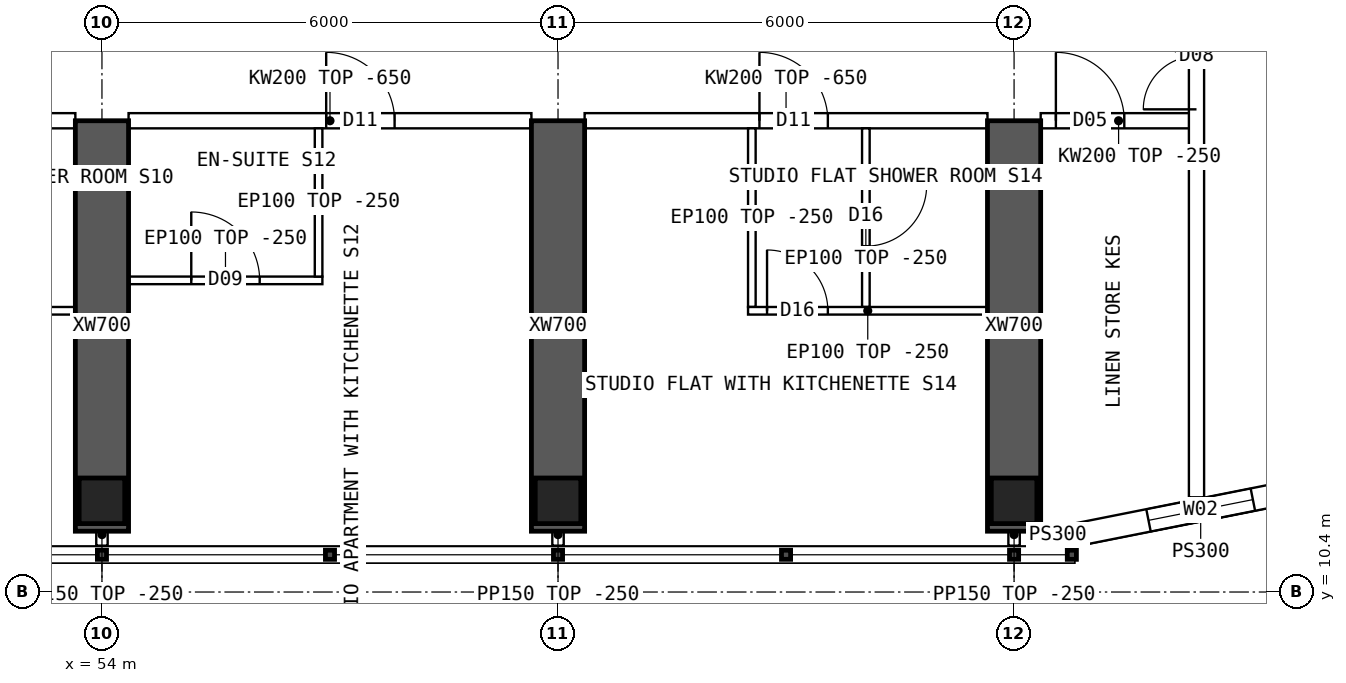
"""IFC4 building model, lengths in metres.
Left out: names, types, materials, properties, quantities, classifications, styles, units other than length and angle.
Written with IfcOpenShell. Run it as: python <this file> out.ifc"""

import sys

from ifc_helpers import new_model, si_unit, direction, frame, frame_2d, origin, origin_2d, place, context, subcontext, project, spatial, polyline, rectangle, hollow_rectangle, outline, extrude, element, fill, save


model = new_model("IFC4")
c1 = context("Model", 3, precision=1e-05, world=origin(), true_north=direction((0.0, 1.0)))
c2 = subcontext(c1, "Body", "Model", "MODEL_VIEW")
j1 = project(units=[si_unit("LENGTHUNIT", "METRE"), si_unit("PLANEANGLEUNIT", "RADIAN")], contexts=[c1])
p1 = place(None, origin())
s1 = spatial("IfcSite", under=j1, at=p1, CompositionType="ELEMENT")
p2 = place(p1, origin())
s2 = spatial("IfcBuilding", under=s1, at=p2, CompositionType="ELEMENT")
p3 = place(p2, frame((0.0, 0.0, 224.05)))
s3 = spatial("IfcBuildingStorey", under=s2, at=p3, CompositionType="ELEMENT", Elevation=224.05)
for number, where, z_axis, x_axis in (
    (1, (54.0, 11.6, 0.0), (0.0, 0.0, 1.0), (1.0, 0.0, 0.0)),
    (2, (60.0, 11.6, 0.0), (0.0, 0.0, 1.0), (1.0, 0.0, 0.0)),
    (3, (66.0, 11.6, 0.0), (0.0, 0.0, 1.0), (1.0, 0.0, 0.0)),
):
    element("IfcColumn", number, at=place(p3, frame(where, z_axis=z_axis, x_axis=x_axis)), inside=s3, PredefinedType="COLUMN", context=c2, shape_type="SweptSolid", body=[
        extrude(hollow_rectangle(XDim=0.6, YDim=0.6, WallThickness=0.06, at=origin_2d()), origin(), (0.0, 0.0, 1.0), 3.75),
    ])
for number, where, z_axis, x_axis in (
    (4, (54.0, 11.2, 0.0), (0.0, 0.0, 1.0), (0.0, 1.0, 0.0)),
    (5, (60.0, 11.2, 0.0), (0.0, 0.0, 1.0), (0.0, 1.0, 0.0)),
    (6, (66.0, 11.2, 0.0), (0.0, 0.0, 1.0), (0.0, 1.0, 0.0)),
):
    element("IfcWall", number, at=place(p3, frame(where, z_axis=z_axis, x_axis=x_axis)), inside=s3, PredefinedType="SHEAR", context=c2, shape_type="SweptSolid", body=[
        extrude(rectangle(XDim=5.4, YDim=0.7, at=frame_2d((2.7, 0.0))), origin(), (0.0, 0.0, 1.0), 3.75),
    ])
p4 = place(p3, frame((66.8, 11.15, 0.0), z_axis=(0.0, 0.0, 1.0), x_axis=(0.98078325777, 0.195100490205, 0.0)))
e7 = element("IfcWall", 7, at=p4, inside=s3, PredefinedType="SOLIDWALL", context=c2, shape_type="SweptSolid", body=[
    extrude(outline(polyline([(-0.03, -0.15), (3.405, -0.15), (3.345, 0.15), (0.03, 0.15), (-0.03, -0.15)])), origin(), (0.0, 0.0, 1.0), 3.5),
])
p5 = place(p4, frame((0.988, 0.0, 0.9)))
e8 = element("IfcOpeningElement", 8, at=p5, cuts=e7, PredefinedType="OPENING", context=c2, shape_type="SweptSolid", body=[
    extrude(rectangle(XDim=1.4, YDim=1.8, at=frame_2d((0.7, 0.9))), frame((0.0, 0.16, 0.0), z_axis=(0.0, -1.0, 0.0), x_axis=(1.0, 0.0, 0.0)), (0.0, 0.0, 1.0), 0.32),
])
p6 = place(p3, frame((66.8, 11.15, 0.0), z_axis=(0.0, 0.0, 1.0), x_axis=(-1.0, 0.0, 0.0)))
e9 = element("IfcWall", 9, at=p6, inside=s3, PredefinedType="SOLIDWALL", context=c2, shape_type="SweptSolid", body=[
    extrude(rectangle(XDim=0.45, YDim=0.3, at=frame_2d((0.225, 0.0))), origin(), (0.0, 0.0, 1.0), 3.5),
])
p7 = place(p3, frame((48.35, 16.6, 0.0), z_axis=(0.0, 0.0, 1.0), x_axis=(1.0, 0.0, 0.0)))
e10 = element("IfcWall", 10, at=p7, inside=s3, PredefinedType="SOLIDWALL", context=c2, shape_type="SweptSolid", body=[
    extrude(outline(polyline([(0.0, 0.0), (5.3, 0.0), (5.3, 3.1), (0.0, 3.1), (0.0, 0.0)])), frame((0.0, 0.1, 0.0), z_axis=(0.0, -1.0, 0.0), x_axis=(1.0, 0.0, 0.0)), (0.0, 0.0, 1.0), 0.2),
])
p8 = place(p7, frame((2.3, 0.0, 0.0)))
e11 = element("IfcOpeningElement", 11, at=p8, cuts=e10, PredefinedType="OPENING", context=c2, shape_type="SweptSolid", body=[
    extrude(rectangle(XDim=0.9, YDim=2.1, at=frame_2d((0.45, 1.05))), frame((0.0, 0.11, 0.0), z_axis=(0.0, -1.0, 0.0), x_axis=(1.0, 0.0, 0.0)), (0.0, 0.0, 1.0), 0.22),
])
p9 = place(p3, frame((54.35, 16.6, 0.0), z_axis=(0.0, 0.0, 1.0), x_axis=(1.0, 0.0, 0.0)))
e12 = element("IfcWall", 12, at=p9, inside=s3, PredefinedType="SOLIDWALL", context=c2, shape_type="SweptSolid", body=[
    extrude(outline(polyline([(0.0, 0.0), (5.3, 0.0), (5.3, 3.1), (0.0, 3.1), (0.0, 0.0)])), frame((0.0, 0.1, 0.0), z_axis=(0.0, -1.0, 0.0), x_axis=(1.0, 0.0, 0.0)), (0.0, 0.0, 1.0), 0.2),
])
p10 = place(p9, frame((2.6, 0.0, 0.0)))
e13 = element("IfcOpeningElement", 13, at=p10, cuts=e12, PredefinedType="OPENING", context=c2, shape_type="SweptSolid", body=[
    extrude(rectangle(XDim=0.9, YDim=2.1, at=frame_2d((0.45, 1.05))), frame((0.0, 0.11, 0.0), z_axis=(0.0, -1.0, 0.0), x_axis=(1.0, 0.0, 0.0)), (0.0, 0.0, 1.0), 0.22),
])
p11 = place(p3, frame((60.35, 16.6, 0.0), z_axis=(0.0, 0.0, 1.0), x_axis=(1.0, 0.0, 0.0)))
e14 = element("IfcWall", 14, at=p11, inside=s3, PredefinedType="SOLIDWALL", context=c2, shape_type="SweptSolid", body=[
    extrude(outline(polyline([(0.0, 0.0), (5.3, 0.0), (5.3, 3.1), (0.0, 3.1), (0.0, 0.0)])), frame((0.0, 0.1, 0.0), z_axis=(0.0, -1.0, 0.0), x_axis=(1.0, 0.0, 0.0)), (0.0, 0.0, 1.0), 0.2),
])
p12 = place(p11, frame((2.3, 0.0, 0.0)))
e15 = element("IfcOpeningElement", 15, at=p12, cuts=e14, PredefinedType="OPENING", context=c2, shape_type="SweptSolid", body=[
    extrude(rectangle(XDim=0.9, YDim=2.1, at=frame_2d((0.45, 1.05))), frame((0.0, 0.11, 0.0), z_axis=(0.0, -1.0, 0.0), x_axis=(1.0, 0.0, 0.0)), (0.0, 0.0, 1.0), 0.22),
])
p13 = place(p3, frame((66.35, 16.6, 0.0), z_axis=(0.0, 0.0, 1.0), x_axis=(1.0, 0.0, 0.0)))
e16 = element("IfcWall", 16, at=p13, inside=s3, PredefinedType="SOLIDWALL", context=c2, shape_type="SweptSolid", body=[
    extrude(rectangle(XDim=2.05, YDim=0.2, at=frame_2d((1.025, 0.0))), origin(), (0.0, 0.0, 1.0), 3.5),
])
p14 = place(p13, frame((0.2, 0.0, 0.0)))
e17 = element("IfcOpeningElement", 17, at=p14, cuts=e16, PredefinedType="OPENING", context=c2, shape_type="SweptSolid", body=[
    extrude(rectangle(XDim=0.9, YDim=2.1, at=frame_2d((0.45, 1.05))), frame((0.0, 0.11, 0.0), z_axis=(0.0, -1.0, 0.0), x_axis=(1.0, 0.0, 0.0)), (0.0, 0.0, 1.0), 0.22),
])
p15 = place(p3, frame((53.65, 14.1, 0.0), z_axis=(0.0, 0.0, 1.0), x_axis=(-1.0, 0.0, 0.0)))
e18 = element("IfcWall", 18, at=p15, inside=s3, PredefinedType="PARTITIONING", context=c2, shape_type="SweptSolid", body=[
    extrude(rectangle(XDim=3.15, YDim=0.1, at=frame_2d((1.575, 0.0))), origin(), (0.0, 0.0, 1.0), 3.5),
])
p16 = place(p15, frame((2.1, 0.0, 0.0)))
e19 = element("IfcOpeningElement", 19, at=p16, cuts=e18, PredefinedType="OPENING", context=c2, shape_type="SweptSolid", body=[
    extrude(rectangle(XDim=0.8, YDim=2.1, at=frame_2d((0.4, 1.05))), frame((0.0, 0.06, 0.0), z_axis=(0.0, -1.0, 0.0), x_axis=(1.0, 0.0, 0.0)), (0.0, 0.0, 1.0), 0.12),
])
p17 = place(p3, frame((56.9, 14.5, 0.0), z_axis=(0.0, 0.0, 1.0), x_axis=(-1.0, 0.0, 0.0)))
e20 = element("IfcWall", 20, at=p17, inside=s3, PredefinedType="PARTITIONING", context=c2, shape_type="SweptSolid", body=[
    extrude(rectangle(XDim=2.55, YDim=0.1, at=frame_2d((1.275, 0.0))), origin(), (0.0, 0.0, 1.0), 3.5),
])
p18 = place(p17, frame((0.825, 0.0, 0.0)))
e21 = element("IfcOpeningElement", 21, at=p18, cuts=e20, PredefinedType="OPENING", context=c2, shape_type="SweptSolid", body=[
    extrude(rectangle(XDim=0.9, YDim=2.1, at=frame_2d((0.45, 1.05))), frame((0.0, 0.06, 0.0), z_axis=(0.0, -1.0, 0.0), x_axis=(1.0, 0.0, 0.0)), (0.0, 0.0, 1.0), 0.12),
])
p19 = place(p3, frame((56.85, 14.55, 0.0), z_axis=(0.0, 0.0, 1.0), x_axis=(0.0, 1.0, 0.0)))
e22 = element("IfcWall", 22, at=p19, inside=s3, PredefinedType="PARTITIONING", context=c2, shape_type="SweptSolid", body=[
    extrude(outline(polyline([(0.0, 0.0), (1.95, 0.0), (1.95, 3.1), (1.902, 3.1), (1.9, 3.5), (0.0, 3.5), (0.0, 0.0)])), frame((0.0, 0.05, 0.0), z_axis=(0.0, -1.0, 0.0), x_axis=(1.0, 0.0, 0.0)), (0.0, 0.0, 1.0), 0.1),
])
p20 = place(p3, frame((65.65, 14.1, 0.0), z_axis=(0.0, 0.0, 1.0), x_axis=(-1.0, 0.0, 0.0)))
e23 = element("IfcWall", 23, at=p20, inside=s3, PredefinedType="PARTITIONING", context=c2, shape_type="SweptSolid", body=[
    extrude(rectangle(XDim=3.15, YDim=0.1, at=frame_2d((1.575, 0.0))), origin(), (0.0, 0.0, 1.0), 3.5),
])
p21 = place(p20, frame((2.1, 0.0, 0.0)))
e24 = element("IfcOpeningElement", 24, at=p21, cuts=e23, PredefinedType="OPENING", context=c2, shape_type="SweptSolid", body=[
    extrude(rectangle(XDim=0.8, YDim=2.1, at=frame_2d((0.4, 1.05))), frame((0.0, 0.06, 0.0), z_axis=(0.0, -1.0, 0.0), x_axis=(1.0, 0.0, 0.0)), (0.0, 0.0, 1.0), 0.12),
])
p22 = place(p3, frame((62.55, 14.15, 0.0), z_axis=(0.0, 0.0, 1.0), x_axis=(0.0, 1.0, 0.0)))
e25 = element("IfcWall", 25, at=p22, inside=s3, PredefinedType="PARTITIONING", context=c2, shape_type="SweptSolid", body=[
    extrude(outline(polyline([(0.0, 0.0), (2.35, 0.0), (2.35, 3.1), (2.302, 3.1), (2.3, 3.5), (0.0, 3.5), (0.0, 0.0)])), frame((0.0, 0.05, 0.0), z_axis=(0.0, -1.0, 0.0), x_axis=(1.0, 0.0, 0.0)), (0.0, 0.0, 1.0), 0.1),
])
p23 = place(p3, frame((64.05, 14.15, 0.0), z_axis=(0.0, 0.0, 1.0), x_axis=(0.0, 1.0, 0.0)))
e26 = element("IfcWall", 26, at=p23, inside=s3, PredefinedType="PARTITIONING", context=c2, shape_type="SweptSolid", body=[
    extrude(outline(polyline([(0.0, 0.0), (2.35, 0.0), (2.35, 3.1), (2.302, 3.1), (2.3, 3.5), (0.0, 3.5), (0.0, 0.0)])), frame((0.0, 0.05, 0.0), z_axis=(0.0, -1.0, 0.0), x_axis=(1.0, 0.0, 0.0)), (0.0, 0.0, 1.0), 0.1),
])
p24 = place(p23, frame((0.8, 0.0, 0.0)))
e27 = element("IfcOpeningElement", 27, at=p24, cuts=e26, PredefinedType="OPENING", context=c2, shape_type="SweptSolid", body=[
    extrude(rectangle(XDim=0.8, YDim=2.1, at=frame_2d((0.4, 1.05))), frame((0.0, 0.06, 0.0), z_axis=(0.0, -1.0, 0.0), x_axis=(1.0, 0.0, 0.0)), (0.0, 0.0, 1.0), 0.12),
])
p25 = place(p3, frame((68.4, 11.646, 0.0), z_axis=(0.0, 0.0, 1.0), x_axis=(0.0, 1.0, 0.0)))
e28 = element("IfcWall", 28, at=p25, inside=s3, PredefinedType="SOLIDWALL", context=c2, shape_type="SweptSolid", body=[
    extrude(rectangle(XDim=40.708, YDim=0.2, at=frame_2d((20.354, 0.0))), origin(), (0.0, 0.0, 1.0), 3.5),
])
p26 = place(p25, frame((13.434, 0.0, 0.0)))
e29 = element("IfcOpeningElement", 29, at=p26, cuts=e28, PredefinedType="OPENING", context=c2, shape_type="SweptSolid", body=[
    extrude(rectangle(XDim=1.2, YDim=2.1, at=frame_2d((0.6, 1.05))), frame((0.0, 0.11, 0.0), z_axis=(0.0, -1.0, 0.0), x_axis=(1.0, 0.0, 0.0)), (0.0, 0.0, 1.0), 0.22),
])
p27 = place(p25, frame((21.194, 0.0, 0.0)))
e30 = element("IfcOpeningElement", 30, at=p27, cuts=e28, PredefinedType="OPENING", context=c2, shape_type="SweptSolid", body=[
    extrude(rectangle(XDim=1.2, YDim=2.1, at=frame_2d((0.6, 1.05))), frame((0.0, 0.11, 0.0), z_axis=(0.0, -1.0, 0.0), x_axis=(1.0, 0.0, 0.0)), (0.0, 0.0, 1.0), 0.22),
])
p28 = place(p25, frame((5.104, 0.0, 0.0)))
e31 = element("IfcOpeningElement", 31, at=p28, cuts=e28, PredefinedType="OPENING", context=c2, shape_type="SweptSolid", body=[
    extrude(rectangle(XDim=1.4, YDim=2.1, at=frame_2d((0.7, 1.05))), frame((0.0, 0.11, 0.0), z_axis=(0.0, -1.0, 0.0), x_axis=(1.0, 0.0, 0.0)), (0.0, 0.0, 1.0), 0.22),
])
p29 = place(p25, frame((34.104, 0.0, 0.0)))
e32 = element("IfcOpeningElement", 32, at=p29, cuts=e28, PredefinedType="OPENING", context=c2, shape_type="SweptSolid", body=[
    extrude(rectangle(XDim=1.4, YDim=2.1, at=frame_2d((0.7, 1.05))), frame((0.0, 0.11, 0.0), z_axis=(0.0, -1.0, 0.0), x_axis=(1.0, 0.0, 0.0)), (0.0, 0.0, 1.0), 0.22),
])
for number, where, z_axis, x_axis in (
    (33, (54.0, 11.3, 0.0), (0.0, 0.0, 1.0), (0.0, -1.0, 0.0)),
    (34, (60.0, 11.3, 0.0), (0.0, 0.0, 1.0), (0.0, -1.0, 0.0)),
    (35, (66.0, 11.3, 0.0), (0.0, 0.0, 1.0), (0.0, -1.0, 0.0)),
):
    element("IfcWall", number, at=place(p3, frame(where, z_axis=z_axis, x_axis=x_axis)), inside=s3, PredefinedType="PARTITIONING", context=c2, shape_type="SweptSolid", body=[
        extrude(rectangle(XDim=0.29, YDim=0.15, at=frame_2d((0.145, 0.0))), origin(), (0.0, 0.0, 1.0), 3.5),
    ])
p30 = place(p5, origin())
e36 = element("IfcWindow", 36, at=p30, inside=s3, PartitioningType="SINGLE_PANEL", PredefinedType="WINDOW", context=c2, shape_type="SweptSolid", body=[
    extrude(rectangle(XDim=1.4, YDim=1.8, at=frame_2d((0.7, 0.9))), frame((0.0, 0.03, 0.0), z_axis=(0.0, -1.0, 0.0), x_axis=(1.0, 0.0, 0.0)), (0.0, 0.0, 1.0), 0.06),
])
fill(e8, e36)
p31 = place(p18, origin())
e37 = element("IfcDoor", 37, at=p31, inside=s3, OperationType="SINGLE_SWING_RIGHT", PredefinedType="DOOR", context=c2, shape_type="SweptSolid", body=[
    extrude(rectangle(XDim=0.9, YDim=2.1, at=frame_2d((0.45, 1.05))), frame((0.0, 0.025, 0.0), z_axis=(0.0, -1.0, 0.0), x_axis=(1.0, 0.0, 0.0)), (0.0, 0.0, 1.0), 0.05),
])
fill(e21, e37)
p32 = place(p10, origin())
e38 = element("IfcDoor", 38, at=p32, inside=s3, OperationType="SINGLE_SWING_LEFT", PredefinedType="DOOR", context=c2, shape_type="SweptSolid", body=[
    extrude(rectangle(XDim=0.9, YDim=2.1, at=frame_2d((0.45, 1.05))), frame((0.0, 0.025, 0.0), z_axis=(0.0, -1.0, 0.0), x_axis=(1.0, 0.0, 0.0)), (0.0, 0.0, 1.0), 0.05),
])
fill(e13, e38)
p33 = place(p21, origin())
e39 = element("IfcDoor", 39, at=p33, inside=s3, OperationType="SINGLE_SWING_RIGHT", PredefinedType="DOOR", context=c2, shape_type="SweptSolid", body=[
    extrude(rectangle(XDim=0.8, YDim=2.1, at=frame_2d((0.4, 1.05))), frame((0.0, 0.025, 0.0), z_axis=(0.0, -1.0, 0.0), x_axis=(1.0, 0.0, 0.0)), (0.0, 0.0, 1.0), 0.05),
])
fill(e24, e39)
p34 = place(p24, origin())
e40 = element("IfcDoor", 40, at=p34, inside=s3, OperationType="SINGLE_SWING_RIGHT", PredefinedType="DOOR", context=c2, shape_type="SweptSolid", body=[
    extrude(rectangle(XDim=0.8, YDim=2.1, at=frame_2d((0.4, 1.05))), frame((0.0, 0.025, 0.0), z_axis=(0.0, -1.0, 0.0), x_axis=(1.0, 0.0, 0.0)), (0.0, 0.0, 1.0), 0.05),
])
fill(e27, e40)
p35 = place(p12, origin())
e41 = element("IfcDoor", 41, at=p35, inside=s3, OperationType="SINGLE_SWING_LEFT", PredefinedType="DOOR", context=c2, shape_type="SweptSolid", body=[
    extrude(rectangle(XDim=0.9, YDim=2.1, at=frame_2d((0.45, 1.05))), frame((0.0, 0.025, 0.0), z_axis=(0.0, -1.0, 0.0), x_axis=(1.0, 0.0, 0.0)), (0.0, 0.0, 1.0), 0.05),
])
fill(e15, e41)
p36 = place(p28, origin())
e42 = element("IfcDoor", 42, at=p36, inside=s3, OperationType="DOUBLE_DOOR_SINGLE_SWING", PredefinedType="DOOR", context=c2, shape_type="SweptSolid", body=[
    extrude(rectangle(XDim=1.4, YDim=2.1, at=frame_2d((0.7, 1.05))), frame((0.0, 0.025, 0.0), z_axis=(0.0, -1.0, 0.0), x_axis=(1.0, 0.0, 0.0)), (0.0, 0.0, 1.0), 0.05),
])
fill(e31, e42)
p37 = place(p14, origin())
e43 = element("IfcDoor", 43, at=p37, inside=s3, OperationType="SINGLE_SWING_LEFT", PredefinedType="DOOR", context=c2, shape_type="SweptSolid", body=[
    extrude(rectangle(XDim=0.9, YDim=2.1, at=frame_2d((0.45, 1.05))), frame((0.0, 0.025, 0.0), z_axis=(0.0, -1.0, 0.0), x_axis=(1.0, 0.0, 0.0)), (0.0, 0.0, 1.0), 0.05),
])
fill(e17, e43)
save(model, sys.argv[1])
